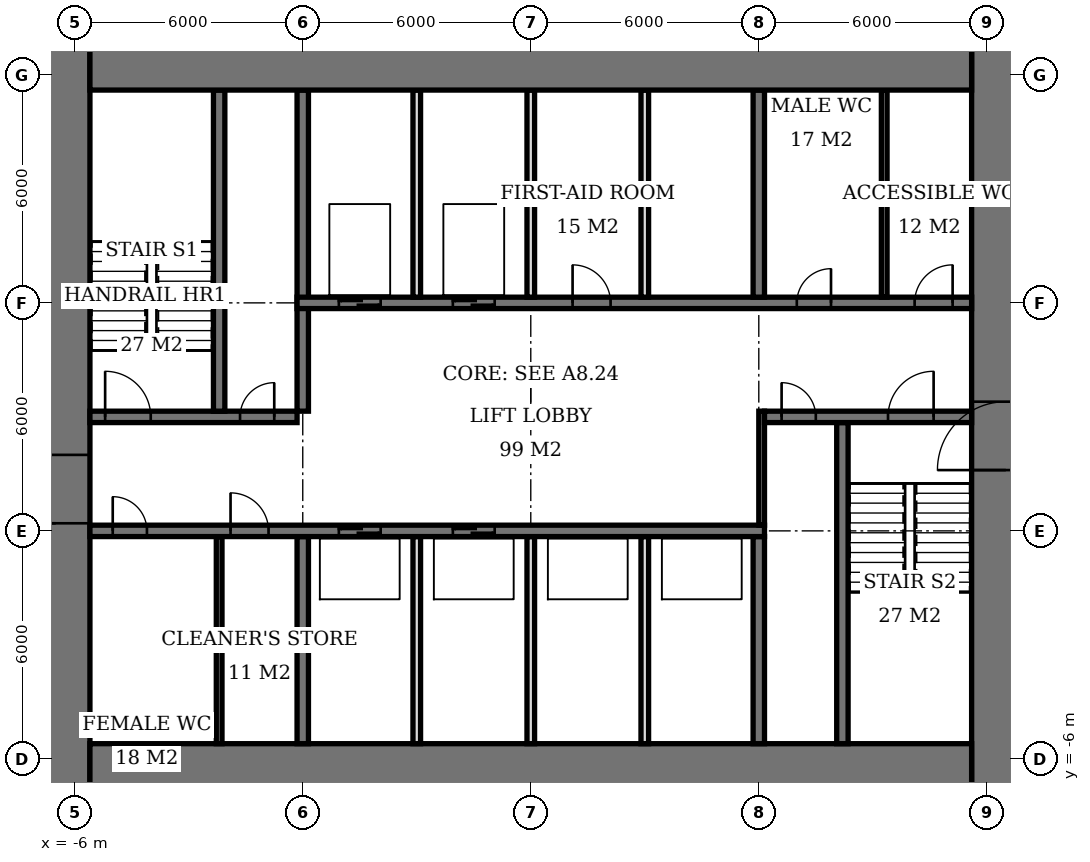
"""IFC4 building model, lengths in metres.
Left out: names, types, materials, properties, quantities, classifications, styles, units other than length and angle.
Written with IfcOpenShell. Run it as: python <this file> out.ifc"""

import sys

from ifc_helpers import new_model, si_unit, direction, frame, frame_2d, origin, place, context, subcontext, project, spatial, rectangle, extrude, element, fill, save


model = new_model("IFC4")
c1 = context("Model", 3, precision=1e-05, world=origin(), true_north=direction((0.0, 1.0)))
c2 = subcontext(c1, "Body", "Model", "MODEL_VIEW")
j1 = project(units=[si_unit("LENGTHUNIT", "METRE"), si_unit("PLANEANGLEUNIT", "RADIAN")], contexts=[c1])
p1 = place(None, origin())
s1 = spatial("IfcSite", under=j1, at=p1, CompositionType="ELEMENT")
p2 = place(p1, origin())
s2 = spatial("IfcBuilding", under=s1, at=p2, CompositionType="ELEMENT")
p3 = place(p2, frame((0.0, 0.0, 148.4)))
s3 = spatial("IfcBuildingStorey", under=s2, at=p3, CompositionType="ELEMENT", Elevation=148.4)
for number, where, z_axis, x_axis in (
    (1, (-5.6, -6.6, 0.0), (0.0, 0.0, 1.0), (1.0, 0.0, 0.0)),
    (2, (-5.6, 12.6, 0.0), (0.0, 0.0, 1.0), (1.0, 0.0, 0.0)),
):
    element("IfcWall", number, at=place(p3, frame(where, z_axis=z_axis, x_axis=x_axis)), inside=s3, PredefinedType="SHEAR", context=c2, shape_type="SweptSolid", body=[
        extrude(rectangle(XDim=23.2, YDim=2.0, at=frame_2d((11.6, 0.0))), origin(), (0.0, 0.0, 1.0), 3.9),
    ])
p4 = place(p3, frame((-6.5, -7.6, 0.0), z_axis=(0.0, 0.0, 1.0), x_axis=(0.0, 1.0, 0.0)))
e3 = element("IfcWall", 3, at=p4, inside=s3, PredefinedType="SHEAR", context=c2, shape_type="SweptSolid", body=[
    extrude(rectangle(XDim=21.2, YDim=1.8, at=frame_2d((10.6, 0.0))), origin(), (0.0, 0.0, 1.0), 3.9),
])
p5 = place(p4, frame((7.8, 0.0, 0.0)))
e4 = element("IfcOpeningElement", 4, at=p5, cuts=e3, PredefinedType="OPENING", context=c2, shape_type="SweptSolid", body=[
    extrude(rectangle(XDim=1.8, YDim=2.4, at=frame_2d((0.9, 1.2))), frame((0.0, 0.91, 0.0), z_axis=(0.0, -1.0, 0.0), x_axis=(1.0, 0.0, 0.0)), (0.0, 0.0, 1.0), 1.82),
])
p6 = place(p3, frame((18.5, -7.6, 0.0), z_axis=(0.0, 0.0, 1.0), x_axis=(0.0, 1.0, 0.0)))
e5 = element("IfcWall", 5, at=p6, inside=s3, PredefinedType="SHEAR", context=c2, shape_type="SweptSolid", body=[
    extrude(rectangle(XDim=21.2, YDim=1.8, at=frame_2d((10.6, 0.0))), origin(), (0.0, 0.0, 1.0), 3.9),
])
p7 = place(p6, frame((9.2, 0.0, 0.0)))
e6 = element("IfcOpeningElement", 6, at=p7, cuts=e5, PredefinedType="OPENING", context=c2, shape_type="SweptSolid", body=[
    extrude(rectangle(XDim=1.8, YDim=2.4, at=frame_2d((0.9, 1.2))), frame((0.0, 0.91, 0.0), z_axis=(0.0, -1.0, 0.0), x_axis=(1.0, 0.0, 0.0)), (0.0, 0.0, 1.0), 1.82),
])
p8 = place(p3, frame((-5.6, 0.0, 0.0), z_axis=(0.0, 0.0, 1.0), x_axis=(1.0, 0.0, 0.0)))
e7 = element("IfcWall", 7, at=p8, inside=s3, PredefinedType="SHEAR", context=c2, shape_type="SweptSolid", body=[
    extrude(rectangle(XDim=17.75, YDim=0.3, at=frame_2d((8.875, 0.0))), origin(), (0.0, 0.0, 1.0), 3.9),
])
p9 = place(p8, frame((0.6, 0.0, 0.0)))
e8 = element("IfcOpeningElement", 8, at=p9, cuts=e7, PredefinedType="OPENING", context=c2, shape_type="SweptSolid", body=[
    extrude(rectangle(XDim=0.9, YDim=2.1, at=frame_2d((0.45, 1.05))), frame((0.0, 0.16, 0.0), z_axis=(0.0, -1.0, 0.0), x_axis=(1.0, 0.0, 0.0)), (0.0, 0.0, 1.0), 0.32),
])
p10 = place(p8, frame((3.7, 0.0, 0.0)))
e9 = element("IfcOpeningElement", 9, at=p10, cuts=e7, PredefinedType="OPENING", context=c2, shape_type="SweptSolid", body=[
    extrude(rectangle(XDim=1.0, YDim=2.1, at=frame_2d((0.5, 1.05))), frame((0.0, 0.16, 0.0), z_axis=(0.0, -1.0, 0.0), x_axis=(1.0, 0.0, 0.0)), (0.0, 0.0, 1.0), 0.32),
])
p11 = place(p8, frame((6.55, 0.0, 0.0)))
e10 = element("IfcOpeningElement", 10, at=p11, cuts=e7, PredefinedType="OPENING", context=c2, shape_type="SweptSolid", body=[
    extrude(rectangle(XDim=1.1, YDim=2.1, at=frame_2d((0.55, 1.05))), frame((0.0, 0.16, 0.0), z_axis=(0.0, -1.0, 0.0), x_axis=(1.0, 0.0, 0.0)), (0.0, 0.0, 1.0), 0.32),
])
p12 = place(p8, frame((9.55, 0.0, 0.0)))
e11 = element("IfcOpeningElement", 11, at=p12, cuts=e7, PredefinedType="OPENING", context=c2, shape_type="SweptSolid", body=[
    extrude(rectangle(XDim=1.1, YDim=2.1, at=frame_2d((0.55, 1.05))), frame((0.0, 0.16, 0.0), z_axis=(0.0, -1.0, 0.0), x_axis=(1.0, 0.0, 0.0)), (0.0, 0.0, 1.0), 0.32),
])
p13 = place(p3, frame((-5.6, 3.0, 0.0), z_axis=(0.0, 0.0, 1.0), x_axis=(1.0, 0.0, 0.0)))
e12 = element("IfcWall", 12, at=p13, inside=s3, PredefinedType="SHEAR", context=c2, shape_type="SweptSolid", body=[
    extrude(rectangle(XDim=5.45, YDim=0.3, at=frame_2d((2.725, 0.0))), origin(), (0.0, 0.0, 1.0), 3.9),
])
p14 = place(p13, frame((0.4, 0.0, 0.0)))
e13 = element("IfcOpeningElement", 13, at=p14, cuts=e12, PredefinedType="OPENING", context=c2, shape_type="SweptSolid", body=[
    extrude(rectangle(XDim=1.2, YDim=2.1, at=frame_2d((0.6, 1.05))), frame((0.0, 0.16, 0.0), z_axis=(0.0, -1.0, 0.0), x_axis=(1.0, 0.0, 0.0)), (0.0, 0.0, 1.0), 0.32),
])
p15 = place(p13, frame((3.95, 0.0, 0.0)))
e14 = element("IfcOpeningElement", 14, at=p15, cuts=e12, PredefinedType="OPENING", context=c2, shape_type="SweptSolid", body=[
    extrude(rectangle(XDim=0.9, YDim=2.1, at=frame_2d((0.45, 1.05))), frame((0.0, 0.16, 0.0), z_axis=(0.0, -1.0, 0.0), x_axis=(1.0, 0.0, 0.0)), (0.0, 0.0, 1.0), 0.32),
])
p16 = place(p3, frame((12.15, 3.0, 0.0), z_axis=(0.0, 0.0, 1.0), x_axis=(1.0, 0.0, 0.0)))
e15 = element("IfcWall", 15, at=p16, inside=s3, PredefinedType="SHEAR", context=c2, shape_type="SweptSolid", body=[
    extrude(rectangle(XDim=5.45, YDim=0.3, at=frame_2d((2.725, 0.0))), origin(), (0.0, 0.0, 1.0), 3.9),
])
p17 = place(p16, frame((3.25, 0.0, 0.0)))
e16 = element("IfcOpeningElement", 16, at=p17, cuts=e15, PredefinedType="OPENING", context=c2, shape_type="SweptSolid", body=[
    extrude(rectangle(XDim=1.2, YDim=2.1, at=frame_2d((0.6, 1.05))), frame((0.0, 0.16, 0.0), z_axis=(0.0, -1.0, 0.0), x_axis=(1.0, 0.0, 0.0)), (0.0, 0.0, 1.0), 0.32),
])
p18 = place(p16, frame((0.45, 0.0, 0.0)))
e17 = element("IfcOpeningElement", 17, at=p18, cuts=e15, PredefinedType="OPENING", context=c2, shape_type="SweptSolid", body=[
    extrude(rectangle(XDim=0.9, YDim=2.1, at=frame_2d((0.45, 1.05))), frame((0.0, 0.16, 0.0), z_axis=(0.0, -1.0, 0.0), x_axis=(1.0, 0.0, 0.0)), (0.0, 0.0, 1.0), 0.32),
])
p19 = place(p3, frame((-0.15, 6.0, 0.0), z_axis=(0.0, 0.0, 1.0), x_axis=(1.0, 0.0, 0.0)))
e18 = element("IfcWall", 18, at=p19, inside=s3, PredefinedType="SHEAR", context=c2, shape_type="SweptSolid", body=[
    extrude(rectangle(XDim=17.75, YDim=0.3, at=frame_2d((8.875, 0.0))), origin(), (0.0, 0.0, 1.0), 3.9),
])
p20 = place(p19, frame((13.15, 0.0, 0.0)))
e19 = element("IfcOpeningElement", 19, at=p20, cuts=e18, PredefinedType="OPENING", context=c2, shape_type="SweptSolid", body=[
    extrude(rectangle(XDim=0.9, YDim=2.1, at=frame_2d((0.45, 1.05))), frame((0.0, 0.16, 0.0), z_axis=(0.0, -1.0, 0.0), x_axis=(1.0, 0.0, 0.0)), (0.0, 0.0, 1.0), 0.32),
])
p21 = place(p19, frame((16.25, 0.0, 0.0)))
e20 = element("IfcOpeningElement", 20, at=p21, cuts=e18, PredefinedType="OPENING", context=c2, shape_type="SweptSolid", body=[
    extrude(rectangle(XDim=1.0, YDim=2.1, at=frame_2d((0.5, 1.05))), frame((0.0, 0.16, 0.0), z_axis=(0.0, -1.0, 0.0), x_axis=(1.0, 0.0, 0.0)), (0.0, 0.0, 1.0), 0.32),
])
p22 = place(p19, frame((7.25, 0.0, 0.0)))
e21 = element("IfcOpeningElement", 21, at=p22, cuts=e18, PredefinedType="OPENING", context=c2, shape_type="SweptSolid", body=[
    extrude(rectangle(XDim=1.0, YDim=2.1, at=frame_2d((0.5, 1.05))), frame((0.0, 0.16, 0.0), z_axis=(0.0, -1.0, 0.0), x_axis=(1.0, 0.0, 0.0)), (0.0, 0.0, 1.0), 0.32),
])
p23 = place(p19, frame((1.1, 0.0, 0.0)))
e22 = element("IfcOpeningElement", 22, at=p23, cuts=e18, PredefinedType="OPENING", context=c2, shape_type="SweptSolid", body=[
    extrude(rectangle(XDim=1.1, YDim=2.1, at=frame_2d((0.55, 1.05))), frame((0.0, 0.16, 0.0), z_axis=(0.0, -1.0, 0.0), x_axis=(1.0, 0.0, 0.0)), (0.0, 0.0, 1.0), 0.32),
])
p24 = place(p19, frame((4.1, 0.0, 0.0)))
e23 = element("IfcOpeningElement", 23, at=p24, cuts=e18, PredefinedType="OPENING", context=c2, shape_type="SweptSolid", body=[
    extrude(rectangle(XDim=1.1, YDim=2.1, at=frame_2d((0.55, 1.05))), frame((0.0, 0.16, 0.0), z_axis=(0.0, -1.0, 0.0), x_axis=(1.0, 0.0, 0.0)), (0.0, 0.0, 1.0), 0.32),
])
p25 = place(p3, frame((0.0, -5.6, 0.0), z_axis=(0.0, 0.0, 1.0), x_axis=(0.0, 1.0, 0.0)))
e24 = element("IfcWall", 24, at=p25, inside=s3, PredefinedType="SHEAR", context=c2, shape_type="SweptSolid", body=[
    extrude(rectangle(XDim=5.45, YDim=0.3, at=frame_2d((2.725, 0.0))), origin(), (0.0, 0.0, 1.0), 3.9),
])
p26 = place(p3, frame((0.0, 3.15, 0.0), z_axis=(0.0, 0.0, 1.0), x_axis=(0.0, 1.0, 0.0)))
e25 = element("IfcWall", 25, at=p26, inside=s3, PredefinedType="SHEAR", context=c2, shape_type="SweptSolid", body=[
    extrude(rectangle(XDim=8.45, YDim=0.3, at=frame_2d((4.225, 0.0))), origin(), (0.0, 0.0, 1.0), 3.9),
])
for number, where, z_axis, x_axis in (
    (26, (12.0, -5.6, 0.0), (0.0, 0.0, 1.0), (0.0, 1.0, 0.0)),
    (27, (12.0, 6.15, 0.0), (0.0, 0.0, 1.0), (0.0, 1.0, 0.0)),
):
    element("IfcWall", number, at=place(p3, frame(where, z_axis=z_axis, x_axis=x_axis)), inside=s3, PredefinedType="SHEAR", context=c2, shape_type="SweptSolid", body=[
        extrude(rectangle(XDim=5.45, YDim=0.3, at=frame_2d((2.725, 0.0))), origin(), (0.0, 0.0, 1.0), 3.9),
    ])
for number, where, z_axis, x_axis in (
    (28, (-2.2, 3.15, 0.0), (0.0, 0.0, 1.0), (0.0, 1.0, 0.0)),
    (29, (14.2, -5.6, 0.0), (0.0, 0.0, 1.0), (0.0, 1.0, 0.0)),
):
    element("IfcWall", number, at=place(p3, frame(where, z_axis=z_axis, x_axis=x_axis)), inside=s3, PredefinedType="SHEAR", context=c2, shape_type="SweptSolid", body=[
        extrude(rectangle(XDim=8.45, YDim=0.3, at=frame_2d((4.225, 0.0))), origin(), (0.0, 0.0, 1.0), 3.9),
    ])
for number, where, z_axis, x_axis in (
    (30, (3.0, 6.15, 0.0), (0.0, 0.0, 1.0), (0.0, 1.0, 0.0)),
    (31, (6.0, 6.15, 0.0), (0.0, 0.0, 1.0), (0.0, 1.0, 0.0)),
    (32, (9.0, 6.15, 0.0), (0.0, 0.0, 1.0), (0.0, 1.0, 0.0)),
    (33, (3.0, -5.6, 0.0), (0.0, 0.0, 1.0), (0.0, 1.0, 0.0)),
    (34, (6.0, -5.6, 0.0), (0.0, 0.0, 1.0), (0.0, 1.0, 0.0)),
    (35, (9.0, -5.6, 0.0), (0.0, 0.0, 1.0), (0.0, 1.0, 0.0)),
):
    element("IfcWall", number, at=place(p3, frame(where, z_axis=z_axis, x_axis=x_axis)), inside=s3, PredefinedType="SOLIDWALL", context=c2, shape_type="SweptSolid", body=[
        extrude(rectangle(XDim=5.45, YDim=0.2, at=frame_2d((2.725, 0.0))), origin(), (0.0, 0.0, 1.0), 3.9),
    ])
for number, where, z_axis, x_axis in (
    (36, (-2.2, -5.6, 0.0), (0.0, 0.0, 1.0), (0.0, 1.0, 0.0)),
    (37, (15.3, 6.15, 0.0), (0.0, 0.0, 1.0), (0.0, 1.0, 0.0)),
):
    element("IfcWall", number, at=place(p3, frame(where, z_axis=z_axis, x_axis=x_axis)), inside=s3, PredefinedType="PLUMBINGWALL", context=c2, shape_type="SweptSolid", body=[
        extrude(rectangle(XDim=5.45, YDim=0.15, at=frame_2d((2.725, 0.0))), origin(), (0.0, 0.0, 1.0), 3.65),
    ])
p27 = place(p3, frame((12.075, 0.15, 0.0), z_axis=(0.0, 0.0, 1.0), x_axis=(0.0, 1.0, 0.0)))
e38 = element("IfcWall", 38, at=p27, inside=s3, PredefinedType="PARTITIONING", context=c2, shape_type="SweptSolid", body=[
    extrude(rectangle(XDim=3.0, YDim=0.15, at=frame_2d((1.5, 0.0))), origin(), (0.0, 0.0, 1.0), 3.65),
])
p28 = place(p5, origin())
e39 = element("IfcDoor", 39, at=p28, inside=s3, OperationType="DOUBLE_DOOR_SINGLE_SWING", PredefinedType="DOOR", context=c2, shape_type="SweptSolid", body=[
    extrude(rectangle(XDim=1.8, YDim=2.4, at=frame_2d((0.9, 1.2))), frame((0.0, 0.025, 0.0), z_axis=(0.0, -1.0, 0.0), x_axis=(1.0, 0.0, 0.0)), (0.0, 0.0, 1.0), 0.05),
])
fill(e4, e39)
p29 = place(p7, origin())
e40 = element("IfcDoor", 40, at=p29, inside=s3, OperationType="DOUBLE_DOOR_SINGLE_SWING", PredefinedType="DOOR", context=c2, shape_type="SweptSolid", body=[
    extrude(rectangle(XDim=1.8, YDim=2.4, at=frame_2d((0.9, 1.2))), frame((0.0, 0.025, 0.0), z_axis=(0.0, -1.0, 0.0), x_axis=(1.0, 0.0, 0.0)), (0.0, 0.0, 1.0), 0.05),
])
fill(e6, e40)
p30 = place(p14, origin())
e41 = element("IfcDoor", 41, at=p30, inside=s3, OperationType="SINGLE_SWING_LEFT", PredefinedType="DOOR", context=c2, shape_type="SweptSolid", body=[
    extrude(rectangle(XDim=1.2, YDim=2.1, at=frame_2d((0.6, 1.05))), frame((0.0, 0.025, 0.0), z_axis=(0.0, -1.0, 0.0), x_axis=(1.0, 0.0, 0.0)), (0.0, 0.0, 1.0), 0.05),
])
fill(e13, e41)
p31 = place(p15, origin())
e42 = element("IfcDoor", 42, at=p31, inside=s3, OperationType="SINGLE_SWING_RIGHT", PredefinedType="DOOR", context=c2, shape_type="SweptSolid", body=[
    extrude(rectangle(XDim=0.9, YDim=2.1, at=frame_2d((0.45, 1.05))), frame((0.0, 0.025, 0.0), z_axis=(0.0, -1.0, 0.0), x_axis=(1.0, 0.0, 0.0)), (0.0, 0.0, 1.0), 0.05),
])
fill(e14, e42)
p32 = place(p17, origin())
e43 = element("IfcDoor", 43, at=p32, inside=s3, OperationType="SINGLE_SWING_RIGHT", PredefinedType="DOOR", context=c2, shape_type="SweptSolid", body=[
    extrude(rectangle(XDim=1.2, YDim=2.1, at=frame_2d((0.6, 1.05))), frame((0.0, 0.025, 0.0), z_axis=(0.0, -1.0, 0.0), x_axis=(1.0, 0.0, 0.0)), (0.0, 0.0, 1.0), 0.05),
])
fill(e16, e43)
p33 = place(p18, origin())
e44 = element("IfcDoor", 44, at=p33, inside=s3, OperationType="SINGLE_SWING_LEFT", PredefinedType="DOOR", context=c2, shape_type="SweptSolid", body=[
    extrude(rectangle(XDim=0.9, YDim=2.1, at=frame_2d((0.45, 1.05))), frame((0.0, 0.025, 0.0), z_axis=(0.0, -1.0, 0.0), x_axis=(1.0, 0.0, 0.0)), (0.0, 0.0, 1.0), 0.05),
])
fill(e17, e44)
p34 = place(p9, origin())
e45 = element("IfcDoor", 45, at=p34, inside=s3, OperationType="SINGLE_SWING_LEFT", PredefinedType="DOOR", context=c2, shape_type="SweptSolid", body=[
    extrude(rectangle(XDim=0.9, YDim=2.1, at=frame_2d((0.45, 1.05))), frame((0.0, 0.025, 0.0), z_axis=(0.0, -1.0, 0.0), x_axis=(1.0, 0.0, 0.0)), (0.0, 0.0, 1.0), 0.05),
])
fill(e8, e45)
p35 = place(p10, origin())
e46 = element("IfcDoor", 46, at=p35, inside=s3, OperationType="SINGLE_SWING_LEFT", PredefinedType="DOOR", context=c2, shape_type="SweptSolid", body=[
    extrude(rectangle(XDim=1.0, YDim=2.1, at=frame_2d((0.5, 1.05))), frame((0.0, 0.025, 0.0), z_axis=(0.0, -1.0, 0.0), x_axis=(1.0, 0.0, 0.0)), (0.0, 0.0, 1.0), 0.05),
])
fill(e9, e46)
p36 = place(p20, origin())
e47 = element("IfcDoor", 47, at=p36, inside=s3, OperationType="SINGLE_SWING_RIGHT", PredefinedType="DOOR", context=c2, shape_type="SweptSolid", body=[
    extrude(rectangle(XDim=0.9, YDim=2.1, at=frame_2d((0.45, 1.05))), frame((0.0, 0.025, 0.0), z_axis=(0.0, -1.0, 0.0), x_axis=(1.0, 0.0, 0.0)), (0.0, 0.0, 1.0), 0.05),
])
fill(e19, e47)
p37 = place(p21, origin())
e48 = element("IfcDoor", 48, at=p37, inside=s3, OperationType="SINGLE_SWING_RIGHT", PredefinedType="DOOR", context=c2, shape_type="SweptSolid", body=[
    extrude(rectangle(XDim=1.0, YDim=2.1, at=frame_2d((0.5, 1.05))), frame((0.0, 0.025, 0.0), z_axis=(0.0, -1.0, 0.0), x_axis=(1.0, 0.0, 0.0)), (0.0, 0.0, 1.0), 0.05),
])
fill(e20, e48)
p38 = place(p22, origin())
e49 = element("IfcDoor", 49, at=p38, inside=s3, OperationType="SINGLE_SWING_LEFT", PredefinedType="DOOR", context=c2, shape_type="SweptSolid", body=[
    extrude(rectangle(XDim=1.0, YDim=2.1, at=frame_2d((0.5, 1.05))), frame((0.0, 0.025, 0.0), z_axis=(0.0, -1.0, 0.0), x_axis=(1.0, 0.0, 0.0)), (0.0, 0.0, 1.0), 0.05),
])
fill(e21, e49)
p39 = place(p23, origin())
e50 = element("IfcDoor", 50, at=p39, inside=s3, OperationType="DOUBLE_DOOR_SLIDING", PredefinedType="USERDEFINED", context=c2, shape_type="SweptSolid", body=[
    extrude(rectangle(XDim=1.1, YDim=2.1, at=frame_2d((0.55, 1.05))), frame((0.0, 0.025, 0.0), z_axis=(0.0, -1.0, 0.0), x_axis=(1.0, 0.0, 0.0)), (0.0, 0.0, 1.0), 0.05),
])
fill(e22, e50)
p40 = place(p24, origin())
e51 = element("IfcDoor", 51, at=p40, inside=s3, OperationType="DOUBLE_DOOR_SLIDING", PredefinedType="USERDEFINED", context=c2, shape_type="SweptSolid", body=[
    extrude(rectangle(XDim=1.1, YDim=2.1, at=frame_2d((0.55, 1.05))), frame((0.0, 0.025, 0.0), z_axis=(0.0, -1.0, 0.0), x_axis=(1.0, 0.0, 0.0)), (0.0, 0.0, 1.0), 0.05),
])
fill(e23, e51)
p41 = place(p11, origin())
e52 = element("IfcDoor", 52, at=p41, inside=s3, OperationType="DOUBLE_DOOR_SLIDING", PredefinedType="USERDEFINED", context=c2, shape_type="SweptSolid", body=[
    extrude(rectangle(XDim=1.1, YDim=2.1, at=frame_2d((0.55, 1.05))), frame((0.0, 0.025, 0.0), z_axis=(0.0, -1.0, 0.0), x_axis=(1.0, 0.0, 0.0)), (0.0, 0.0, 1.0), 0.05),
])
fill(e10, e52)
p42 = place(p12, origin())
e53 = element("IfcDoor", 53, at=p42, inside=s3, OperationType="DOUBLE_DOOR_SLIDING", PredefinedType="USERDEFINED", context=c2, shape_type="SweptSolid", body=[
    extrude(rectangle(XDim=1.1, YDim=2.1, at=frame_2d((0.55, 1.05))), frame((0.0, 0.025, 0.0), z_axis=(0.0, -1.0, 0.0), x_axis=(1.0, 0.0, 0.0)), (0.0, 0.0, 1.0), 0.05),
])
fill(e11, e53)
save(model, sys.argv[1])
